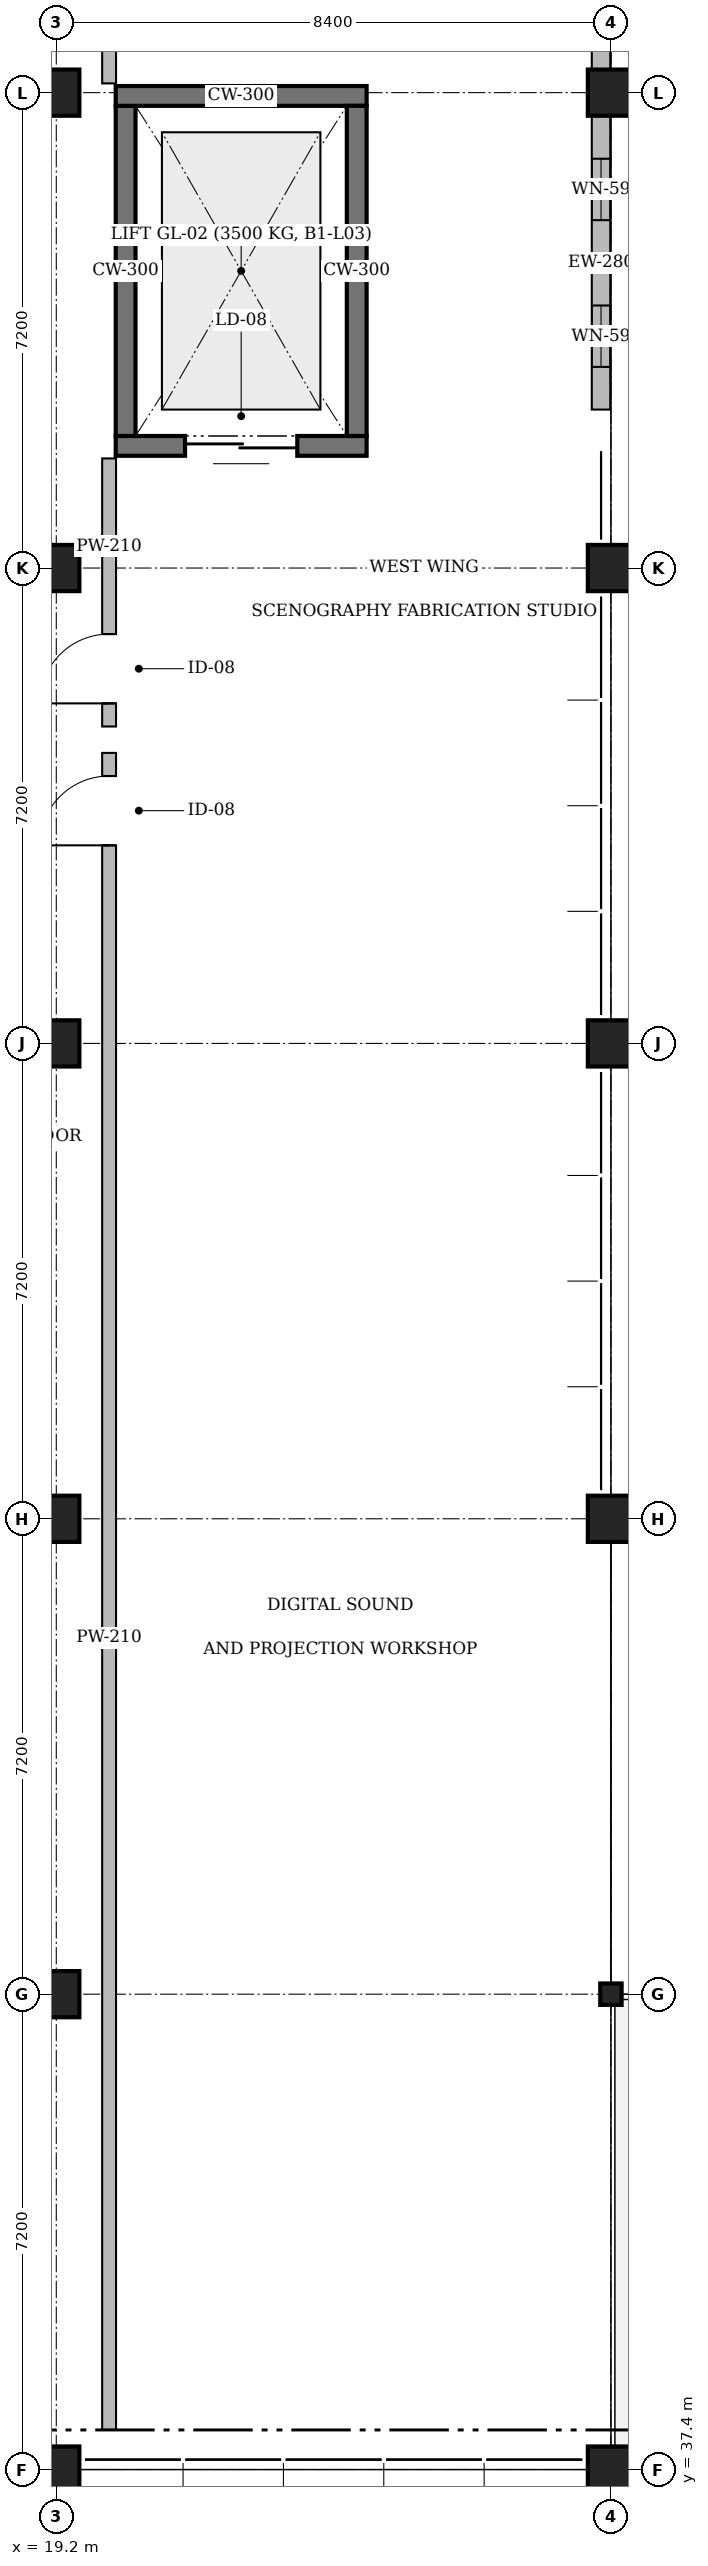
"""IFC4 building model, lengths in metres.
Left out: names, types, materials, properties, quantities, classifications, styles, units other than length and angle.
Written with IfcOpenShell. Run it as: python <this file> out.ifc"""

import sys

from ifc_helpers import new_model, si_unit, direction, frame, frame_2d, origin, origin_2d, place, context, subcontext, project, spatial, rectangle, hollow_circle, extrude, element, fill, save


model = new_model("IFC4")
c1 = context("Model", 3, precision=1e-05, world=origin(), true_north=direction((0.0, 1.0)))
c2 = subcontext(c1, "Body", "Model", "MODEL_VIEW")
j1 = project(units=[si_unit("LENGTHUNIT", "METRE"), si_unit("PLANEANGLEUNIT", "RADIAN")], contexts=[c1])
p1 = place(None, origin())
s1 = spatial("IfcSite", under=j1, at=p1, CompositionType="ELEMENT")
p2 = place(p1, origin())
s2 = spatial("IfcBuilding", under=s1, at=p2, CompositionType="ELEMENT")
p3 = place(p2, origin())
s3 = spatial("IfcBuildingStorey", under=s2, at=p3, CompositionType="ELEMENT", Elevation=0.0)
p4 = place(p3, frame((19.2, 37.4, 0.0), z_axis=(0.0, 0.0, 1.0), x_axis=(1.0, 0.0, 0.0)))
e1 = element("IfcColumn", 1, at=p4, inside=s3, PredefinedType="COLUMN", context=c2, shape_type="SweptSolid", body=[
    extrude(rectangle(XDim=0.7, YDim=0.7, at=origin_2d()), origin(), (0.0, 0.0, 1.0), 4.66),
])
for number, where, z_axis, x_axis in (
    (2, (19.2, 44.6, 0.0), (0.0, 0.0, 1.0), (1.0, 0.0, 0.0)),
    (3, (19.2, 51.8, 0.0), (0.0, 0.0, 1.0), (1.0, 0.0, 0.0)),
    (4, (19.2, 59.0, 0.0), (0.0, 0.0, 1.0), (1.0, 0.0, 0.0)),
    (5, (19.2, 66.2, 0.0), (0.0, 0.0, 1.0), (1.0, 0.0, 0.0)),
    (6, (19.2, 73.4, 0.0), (0.0, 0.0, 1.0), (1.0, 0.0, 0.0)),
):
    element("IfcColumn", number, at=place(p3, frame(where, z_axis=z_axis, x_axis=x_axis)), inside=s3, PredefinedType="COLUMN", context=c2, shape_type="SweptSolid", body=[
        extrude(rectangle(XDim=0.7, YDim=0.7, at=origin_2d()), origin(), (0.0, 0.0, 1.0), 4.8),
    ])
p5 = place(p3, frame((27.6, 37.4, 0.0), z_axis=(0.0, 0.0, 1.0), x_axis=(1.0, 0.0, 0.0)))
e7 = element("IfcColumn", 7, at=p5, inside=s3, PredefinedType="COLUMN", context=c2, shape_type="SweptSolid", body=[
    extrude(rectangle(XDim=0.7, YDim=0.7, at=origin_2d()), origin(), (0.0, 0.0, 1.0), 4.66),
])
p6 = place(p3, frame((27.6, 44.6, 0.0), z_axis=(0.0, 0.0, 1.0), x_axis=(1.0, 0.0, 0.0)))
e8 = element("IfcColumn", 8, at=p6, inside=s3, PredefinedType="COLUMN", context=c2, shape_type="SweptSolid", body=[
    extrude(hollow_circle(Radius=0.162, WallThickness=0.012, at=origin_2d()), origin(), (0.0, 0.0, 1.0), 4.8),
])
for number, where, z_axis, x_axis in (
    (9, (27.6, 51.8, 0.0), (0.0, 0.0, 1.0), (1.0, 0.0, 0.0)),
    (10, (27.6, 59.0, 0.0), (0.0, 0.0, 1.0), (1.0, 0.0, 0.0)),
    (11, (27.6, 66.2, 0.0), (0.0, 0.0, 1.0), (1.0, 0.0, 0.0)),
    (12, (27.6, 73.4, 0.0), (0.0, 0.0, 1.0), (1.0, 0.0, 0.0)),
):
    element("IfcColumn", number, at=place(p3, frame(where, z_axis=z_axis, x_axis=x_axis)), inside=s3, PredefinedType="COLUMN", context=c2, shape_type="SweptSolid", body=[
        extrude(rectangle(XDim=0.7, YDim=0.7, at=origin_2d()), origin(), (0.0, 0.0, 1.0), 4.8),
    ])
p7 = place(p3, frame((23.9, 68.05, 0.0), z_axis=(0.0, 0.0, 1.0), x_axis=(-1.0, 0.0, 0.0)))
e13 = element("IfcWall", 13, at=p7, inside=s3, PredefinedType="SOLIDWALL", context=c2, shape_type="SweptSolid", body=[
    extrude(rectangle(XDim=3.8, YDim=0.3, at=frame_2d((1.9, 0.0))), origin(), (0.0, 0.0, 1.0), 4.8),
])
p8 = place(p7, frame((1.05, 0.0, 0.0)))
e14 = element("IfcOpeningElement", 14, at=p8, cuts=e13, PredefinedType="OPENING", context=c2, shape_type="SweptSolid", body=[
    extrude(rectangle(XDim=1.7, YDim=2.4, at=frame_2d((0.85, 1.2))), frame((0.0, 0.17, 0.0), z_axis=(0.0, -1.0, 0.0), x_axis=(1.0, 0.0, 0.0)), (0.0, 0.0, 1.0), 0.34),
])
p9 = place(p3, frame((20.25, 68.2, 0.0), z_axis=(0.0, 0.0, 1.0), x_axis=(0.0, 1.0, 0.0)))
e15 = element("IfcWall", 15, at=p9, inside=s3, PredefinedType="SOLIDWALL", context=c2, shape_type="SweptSolid", body=[
    extrude(rectangle(XDim=5.0, YDim=0.3, at=frame_2d((2.5, 0.0))), origin(), (0.0, 0.0, 1.0), 4.8),
])
p10 = place(p3, frame((20.1, 73.35, 0.0), z_axis=(0.0, 0.0, 1.0), x_axis=(1.0, 0.0, 0.0)))
e16 = element("IfcWall", 16, at=p10, inside=s3, PredefinedType="SOLIDWALL", context=c2, shape_type="SweptSolid", body=[
    extrude(rectangle(XDim=3.8, YDim=0.3, at=frame_2d((1.9, 0.0))), origin(), (0.0, 0.0, 1.0), 4.8),
])
p11 = place(p3, frame((23.75, 73.2, 0.0), z_axis=(0.0, 0.0, 1.0), x_axis=(0.0, -1.0, 0.0)))
e17 = element("IfcWall", 17, at=p11, inside=s3, PredefinedType="SOLIDWALL", context=c2, shape_type="SweptSolid", body=[
    extrude(rectangle(XDim=5.0, YDim=0.3, at=frame_2d((2.5, 0.0))), origin(), (0.0, 0.0, 1.0), 4.8),
])
p12 = place(p3, frame((27.45, 68.6, 0.0), z_axis=(0.0, 0.0, 1.0), x_axis=(0.0, 1.0, 0.0)))
e18 = element("IfcWall", 18, at=p12, inside=s3, PredefinedType="SOLIDWALL", context=c2, shape_type="SweptSolid", body=[
    extrude(rectangle(XDim=4.445, YDim=0.28, at=frame_2d((2.222, 0.0))), origin(), (0.0, 0.0, 1.0), 3.873),
])
p13 = place(p12, frame((0.646, 0.0, 0.95)))
e19 = element("IfcOpeningElement", 19, at=p13, cuts=e18, PredefinedType="OPENING", context=c2, shape_type="SweptSolid", body=[
    extrude(rectangle(XDim=0.93, YDim=1.8, at=frame_2d((0.465, 0.9))), frame((0.0, 0.16, 0.0), z_axis=(0.0, -1.0, 0.0), x_axis=(1.0, 0.0, 0.0)), (0.0, 0.0, 1.0), 0.32),
])
p14 = place(p12, frame((2.869, 0.0, 0.95)))
e20 = element("IfcOpeningElement", 20, at=p14, cuts=e18, PredefinedType="OPENING", context=c2, shape_type="SweptSolid", body=[
    extrude(rectangle(XDim=0.93, YDim=1.8, at=frame_2d((0.465, 0.9))), frame((0.0, 0.16, 0.0), z_axis=(0.0, -1.0, 0.0), x_axis=(1.0, 0.0, 0.0)), (0.0, 0.0, 1.0), 0.32),
])
p15 = place(p3, frame((27.45, 73.755, 0.0), z_axis=(0.0, 0.0, 1.0), x_axis=(0.0, 1.0, 0.0)))
e21 = element("IfcWall", 21, at=p15, inside=s3, PredefinedType="SOLIDWALL", context=c2, shape_type="SweptSolid", body=[
    extrude(rectangle(XDim=6.49, YDim=0.28, at=frame_2d((3.245, 0.0))), origin(), (0.0, 0.0, 1.0), 3.873),
])
p16 = place(p15, frame((0.948, 0.0, 0.95)))
e22 = element("IfcOpeningElement", 22, at=p16, cuts=e21, PredefinedType="OPENING", context=c2, shape_type="SweptSolid", body=[
    extrude(rectangle(XDim=1.35, YDim=1.95, at=frame_2d((0.675, 0.975))), frame((0.0, 0.16, 0.0), z_axis=(0.0, -1.0, 0.0), x_axis=(1.0, 0.0, 0.0)), (0.0, 0.0, 1.0), 0.32),
])
p17 = place(p15, frame((4.192, 0.0, 0.95)))
e23 = element("IfcOpeningElement", 23, at=p17, cuts=e21, PredefinedType="OPENING", context=c2, shape_type="SweptSolid", body=[
    extrude(rectangle(XDim=1.35, YDim=1.95, at=frame_2d((0.675, 0.975))), frame((0.0, 0.16, 0.0), z_axis=(0.0, -1.0, 0.0), x_axis=(1.0, 0.0, 0.0)), (0.0, 0.0, 1.0), 0.32),
])
p18 = place(p3, frame((20.0, 38.0, 0.0), z_axis=(0.0, 0.0, 1.0), x_axis=(0.0, 1.0, 0.0)))
e24 = element("IfcWall", 24, at=p18, inside=s3, PredefinedType="PARTITIONING", context=c2, shape_type="SweptSolid", body=[
    extrude(rectangle(XDim=25.4, YDim=0.21, at=frame_2d((12.7, 0.0))), origin(), (0.0, 0.0, 1.0), 4.54),
])
p19 = place(p18, frame((24.0, 0.0, 0.0)))
e25 = element("IfcOpeningElement", 25, at=p19, cuts=e24, PredefinedType="OPENING", context=c2, shape_type="SweptSolid", body=[
    extrude(rectangle(XDim=1.05, YDim=2.25, at=frame_2d((0.525, 1.125))), frame((0.0, 0.125, 0.0), z_axis=(0.0, -1.0, 0.0), x_axis=(1.0, 0.0, 0.0)), (0.0, 0.0, 1.0), 0.25),
])
p20 = place(p3, frame((20.0, 63.8, 0.0), z_axis=(0.0, 0.0, 1.0), x_axis=(0.0, 1.0, 0.0)))
e26 = element("IfcWall", 26, at=p20, inside=s3, PredefinedType="PARTITIONING", context=c2, shape_type="SweptSolid", body=[
    extrude(rectangle(XDim=4.06, YDim=0.21, at=frame_2d((2.03, 0.0))), origin(), (0.0, 0.0, 1.0), 4.54),
])
p21 = place(p20, frame((0.35, 0.0, 0.0)))
e27 = element("IfcOpeningElement", 27, at=p21, cuts=e26, PredefinedType="OPENING", context=c2, shape_type="SweptSolid", body=[
    extrude(rectangle(XDim=1.05, YDim=2.25, at=frame_2d((0.525, 1.125))), frame((0.0, 0.125, 0.0), z_axis=(0.0, -1.0, 0.0), x_axis=(1.0, 0.0, 0.0)), (0.0, 0.0, 1.0), 0.25),
])
p22 = place(p3, frame((20.0, 73.54, 0.0), z_axis=(0.0, 0.0, 1.0), x_axis=(0.0, 1.0, 0.0)))
e28 = element("IfcWall", 28, at=p22, inside=s3, PredefinedType="PARTITIONING", context=c2, shape_type="SweptSolid", body=[
    extrude(rectangle(XDim=4.86, YDim=0.21, at=frame_2d((2.43, 0.0))), origin(), (0.0, 0.0, 1.0), 4.54),
])
p23 = place(p8, origin())
e29 = element("IfcDoor", 29, at=p23, inside=s3, OperationType="DOUBLE_DOOR_SLIDING", PredefinedType="DOOR", context=c2, shape_type="SweptSolid", body=[
    extrude(rectangle(XDim=1.7, YDim=2.4, at=frame_2d((0.85, 1.2))), frame((0.0, 0.025, 0.0), z_axis=(0.0, -1.0, 0.0), x_axis=(1.0, 0.0, 0.0)), (0.0, 0.0, 1.0), 0.05),
])
fill(e14, e29)
p24 = place(p13, origin())
e30 = element("IfcWindow", 30, at=p24, inside=s3, PartitioningType="SINGLE_PANEL", PredefinedType="WINDOW", context=c2, shape_type="SweptSolid", body=[
    extrude(rectangle(XDim=0.93, YDim=1.8, at=frame_2d((0.465, 0.9))), frame((0.0, 0.03, 0.0), z_axis=(0.0, -1.0, 0.0), x_axis=(1.0, 0.0, 0.0)), (0.0, 0.0, 1.0), 0.06),
])
fill(e19, e30)
p25 = place(p14, origin())
e31 = element("IfcWindow", 31, at=p25, inside=s3, PartitioningType="SINGLE_PANEL", PredefinedType="WINDOW", context=c2, shape_type="SweptSolid", body=[
    extrude(rectangle(XDim=0.93, YDim=1.8, at=frame_2d((0.465, 0.9))), frame((0.0, 0.03, 0.0), z_axis=(0.0, -1.0, 0.0), x_axis=(1.0, 0.0, 0.0)), (0.0, 0.0, 1.0), 0.06),
])
fill(e20, e31)
p26 = place(p19, origin())
e32 = element("IfcDoor", 32, at=p26, inside=s3, OperationType="SINGLE_SWING_LEFT", PredefinedType="DOOR", context=c2, shape_type="SweptSolid", body=[
    extrude(rectangle(XDim=1.05, YDim=2.25, at=frame_2d((0.525, 1.125))), frame((0.0, 0.025, 0.0), z_axis=(0.0, -1.0, 0.0), x_axis=(1.0, 0.0, 0.0)), (0.0, 0.0, 1.0), 0.05),
])
fill(e25, e32)
p27 = place(p21, origin())
e33 = element("IfcDoor", 33, at=p27, inside=s3, OperationType="SINGLE_SWING_LEFT", PredefinedType="DOOR", context=c2, shape_type="SweptSolid", body=[
    extrude(rectangle(XDim=1.05, YDim=2.25, at=frame_2d((0.525, 1.125))), frame((0.0, 0.025, 0.0), z_axis=(0.0, -1.0, 0.0), x_axis=(1.0, 0.0, 0.0)), (0.0, 0.0, 1.0), 0.05),
])
fill(e27, e33)
save(model, sys.argv[1])
